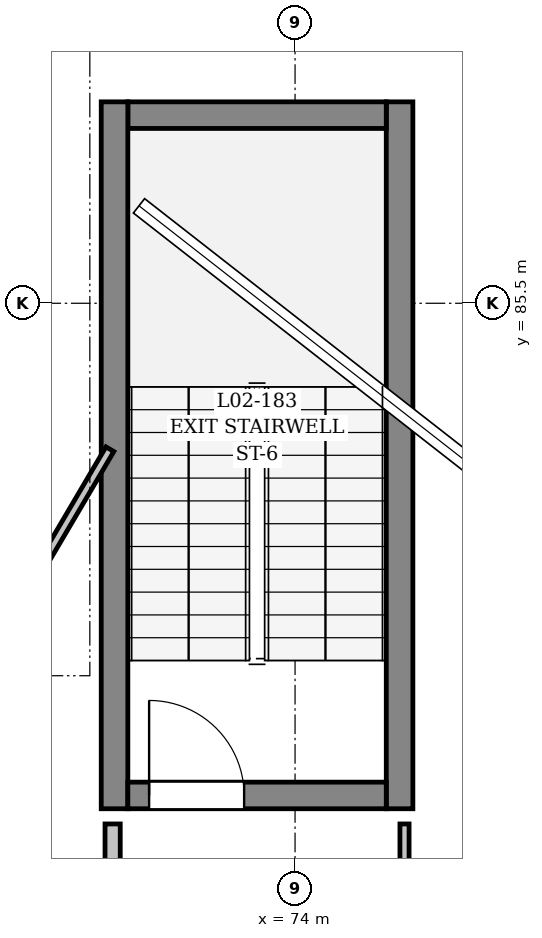
"""IFC4 building model, lengths in metres.
Left out: names, types, materials, properties, quantities, classifications, styles, units other than length and angle.
Written with IfcOpenShell. Run it as: python <this file> out.ifc"""

import sys

from ifc_helpers import new_model, si_unit, direction, frame, frame_2d, origin, place, context, subcontext, project, spatial, rectangle, extrude, element, fill, save


model = new_model("IFC4")
c1 = context("Model", 3, precision=1e-05, world=origin(), true_north=direction((0.0, 1.0)))
c2 = subcontext(c1, "Body", "Model", "MODEL_VIEW")
j1 = project(units=[si_unit("LENGTHUNIT", "METRE"), si_unit("PLANEANGLEUNIT", "RADIAN")], contexts=[c1])
p1 = place(None, origin())
s1 = spatial("IfcSite", under=j1, at=p1, CompositionType="ELEMENT")
p2 = place(p1, origin())
s2 = spatial("IfcBuilding", under=s1, at=p2, CompositionType="ELEMENT")
p3 = place(p2, frame((0.0, 0.0, 5.4)))
s3 = spatial("IfcBuildingStorey", under=s2, at=p3, CompositionType="ELEMENT", Elevation=5.4)
p4 = place(p3, frame((75.375, 78.85, 0.0), z_axis=(0.0, 0.0, 1.0), x_axis=(0.0, 1.0, 0.0)))
e1 = element("IfcWall", 1, at=p4, inside=s3, PredefinedType="SHEAR", context=c2, shape_type="SweptSolid", body=[
    extrude(rectangle(XDim=9.3, YDim=0.35, at=frame_2d((4.65, 0.0))), origin(), (0.0, 0.0, 1.0), 4.5),
])
p5 = place(p3, frame((75.2, 87.975, 0.0), z_axis=(0.0, 0.0, 1.0), x_axis=(-1.0, 0.0, 0.0)))
e2 = element("IfcWall", 2, at=p5, inside=s3, PredefinedType="SHEAR", context=c2, shape_type="SweptSolid", body=[
    extrude(rectangle(XDim=3.4, YDim=0.35, at=frame_2d((1.7, 0.0))), origin(), (0.0, 0.0, 1.0), 4.5),
])
p6 = place(p3, frame((71.625, 88.15, 0.0), z_axis=(0.0, 0.0, 1.0), x_axis=(0.0, -1.0, 0.0)))
e3 = element("IfcWall", 3, at=p6, inside=s3, PredefinedType="SHEAR", context=c2, shape_type="SweptSolid", body=[
    extrude(rectangle(XDim=9.3, YDim=0.35, at=frame_2d((4.65, 0.0))), origin(), (0.0, 0.0, 1.0), 4.5),
])
p7 = place(p3, frame((71.8, 79.025, 0.0), z_axis=(0.0, 0.0, 1.0), x_axis=(1.0, 0.0, 0.0)))
e4 = element("IfcWall", 4, at=p7, inside=s3, PredefinedType="SHEAR", context=c2, shape_type="SweptSolid", body=[
    extrude(rectangle(XDim=3.4, YDim=0.35, at=frame_2d((1.7, 0.0))), origin(), (0.0, 0.0, 1.0), 4.5),
])
p8 = place(p7, frame((0.28, 0.0, 0.0)))
e5 = element("IfcOpeningElement", 5, at=p8, cuts=e4, PredefinedType="OPENING", context=c2, shape_type="SweptSolid", body=[
    extrude(rectangle(XDim=1.25, YDim=2.2, at=frame_2d((0.625, 1.1))), frame((0.0, 0.185, 0.0), z_axis=(0.0, -1.0, 0.0), x_axis=(1.0, 0.0, 0.0)), (0.0, 0.0, 1.0), 0.37),
])
p9 = place(p3, frame((71.6, 78.65, 0.0), z_axis=(0.0, 0.0, 1.0), x_axis=(0.0, -1.0, 0.0)))
e6 = element("IfcWall", 6, at=p9, inside=s3, PredefinedType="PARTITIONING", context=c2, shape_type="SweptSolid", body=[
    extrude(rectangle(XDim=3.05, YDim=0.2, at=frame_2d((1.525, 0.0))), origin(), (0.0, 0.0, 1.0), 4.5),
])
p10 = place(p9, frame((0.9, 0.0, 0.0)))
e7 = element("IfcOpeningElement", 7, at=p10, cuts=e6, PredefinedType="OPENING", context=c2, shape_type="SweptSolid", body=[
    extrude(rectangle(XDim=1.25, YDim=2.2, at=frame_2d((0.625, 1.1))), frame((0.0, 0.11, 0.0), z_axis=(0.0, -1.0, 0.0), x_axis=(1.0, 0.0, 0.0)), (0.0, 0.0, 1.0), 0.22),
])
p11 = place(p3, frame((67.34, 76.41, 0.0), z_axis=(0.0, 0.0, 1.0), x_axis=(0.507554651223, 0.861619565714, 0.0)))
e8 = element("IfcWall", 8, at=p11, inside=s3, PredefinedType="PARTITIONING", context=c2, shape_type="SweptSolid", body=[
    extrude(rectangle(XDim=8.322, YDim=0.12, at=frame_2d((4.161, 0.0))), origin(), (0.0, 0.0, 1.0), 3.84),
])
p12 = place(p11, frame((3.377, 0.0, 0.0)))
e9 = element("IfcOpeningElement", 9, at=p12, cuts=e8, PredefinedType="OPENING", context=c2, shape_type="SweptSolid", body=[
    extrude(rectangle(XDim=0.95, YDim=2.2, at=frame_2d((0.475, 1.1))), frame((0.0, 0.07, 0.0), z_axis=(0.0, -1.0, 0.0), x_axis=(1.0, 0.0, 0.0)), (0.0, 0.0, 1.0), 0.14),
])
p13 = place(p3, frame((75.44, 78.65, 0.0), z_axis=(0.0, 0.0, 1.0), x_axis=(0.0, -1.0, 0.0)))
e10 = element("IfcWall", 10, at=p13, inside=s3, PredefinedType="PARTITIONING", context=c2, shape_type="SweptSolid", body=[
    extrude(rectangle(XDim=3.09, YDim=0.12, at=frame_2d((1.545, 0.0))), origin(), (0.0, 0.0, 1.0), 3.49),
])
p14 = place(p13, frame((1.045, 0.0, 0.0)))
e11 = element("IfcOpeningElement", 11, at=p14, cuts=e10, PredefinedType="OPENING", context=c2, shape_type="SweptSolid", body=[
    extrude(rectangle(XDim=1.0, YDim=2.2, at=frame_2d((0.5, 1.1))), frame((0.0, 0.07, 0.0), z_axis=(0.0, -1.0, 0.0), x_axis=(1.0, 0.0, 0.0)), (0.0, 0.0, 1.0), 0.14),
])
p15 = place(p8, origin())
e12 = element("IfcDoor", 12, at=p15, inside=s3, OperationType="SINGLE_SWING_LEFT", PredefinedType="DOOR", context=c2, shape_type="SweptSolid", body=[
    extrude(rectangle(XDim=1.25, YDim=2.2, at=frame_2d((0.625, 1.1))), frame((0.0, 0.025, 0.0), z_axis=(0.0, -1.0, 0.0), x_axis=(1.0, 0.0, 0.0)), (0.0, 0.0, 1.0), 0.05),
])
fill(e5, e12)
save(model, sys.argv[1])
